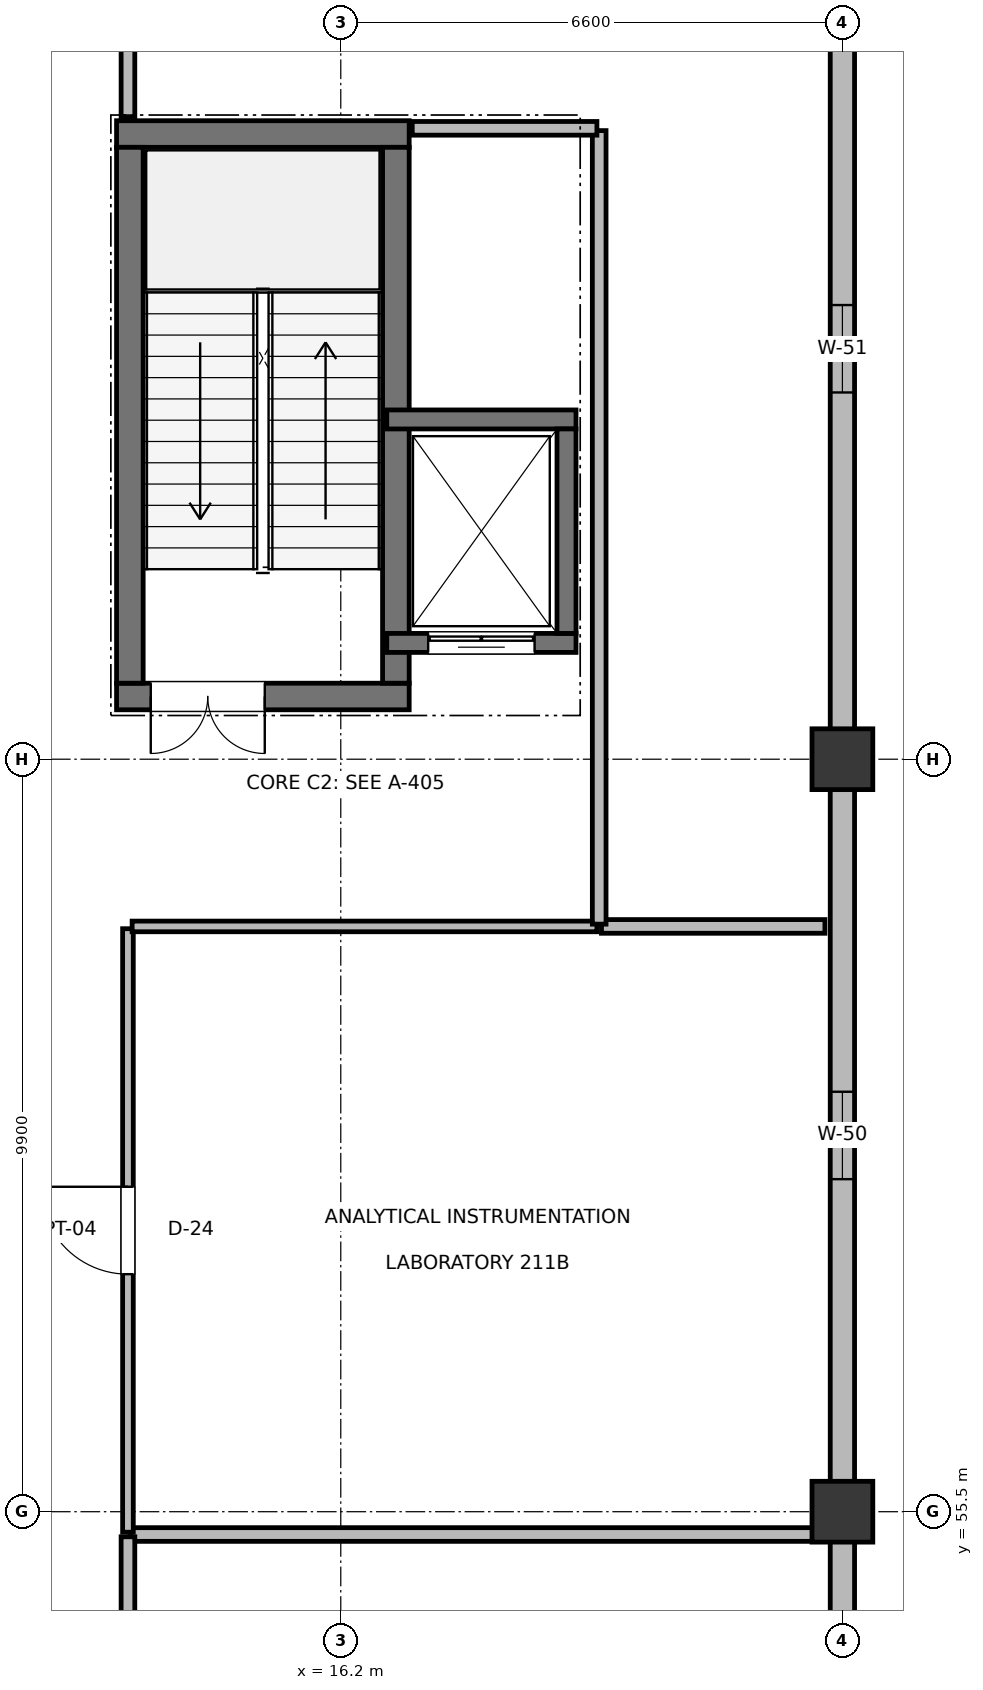
"""IFC4 building model, lengths in metres.
Left out: names, types, materials, properties, quantities, classifications, styles, units other than length and angle.
Written with IfcOpenShell. Run it as: python <this file> out.ifc"""

import sys

from ifc_helpers import new_model, si_unit, direction, frame, frame_2d, origin, origin_2d, place, context, subcontext, project, spatial, rectangle, extrude, element, fill, save


model = new_model("IFC4")
c1 = context("Model", 3, precision=1e-05, world=origin(), true_north=direction((0.0, 1.0)))
c2 = subcontext(c1, "Body", "Model", "MODEL_VIEW")
j1 = project(units=[si_unit("LENGTHUNIT", "METRE"), si_unit("PLANEANGLEUNIT", "RADIAN")], contexts=[c1])
p1 = place(None, origin())
s1 = spatial("IfcSite", under=j1, at=p1, CompositionType="ELEMENT")
p2 = place(p1, origin())
s2 = spatial("IfcBuilding", under=s1, at=p2, CompositionType="ELEMENT")
p3 = place(p2, frame((0.0, 0.0, 10.2)))
s3 = spatial("IfcBuildingStorey", under=s2, at=p3, CompositionType="ELEMENT", Elevation=10.2)
for number, where, z_axis, x_axis in (
    (1, (22.8, 55.5, 0.0), (0.0, 0.0, 1.0), (1.0, 0.0, 0.0)),
    (2, (22.8, 65.4, 0.0), (0.0, 0.0, 1.0), (1.0, 0.0, 0.0)),
):
    element("IfcColumn", number, at=place(p3, frame(where, z_axis=z_axis, x_axis=x_axis)), inside=s3, PredefinedType="COLUMN", context=c2, shape_type="SweptSolid", body=[
        extrude(rectangle(XDim=0.8, YDim=0.8, at=origin_2d()), origin(), (0.0, 0.0, 1.0), 4.8),
    ])
p4 = place(p3, frame((22.8, 45.985, 0.0), z_axis=(0.0, 0.0, 1.0), x_axis=(0.0, 1.0, 0.0)))
e3 = element("IfcWall", 3, at=p4, inside=s3, PredefinedType="SOLIDWALL", context=c2, shape_type="SweptSolid", body=[
    extrude(rectangle(XDim=9.13, YDim=0.32, at=frame_2d((4.565, 0.0))), origin(), (0.0, 0.0, 1.0), 3.625),
])
p5 = place(p4, frame((3.99, 0.0, 0.9)))
e4 = element("IfcOpeningElement", 4, at=p5, cuts=e3, PredefinedType="OPENING", context=c2, shape_type="SweptSolid", body=[
    extrude(rectangle(XDim=1.15, YDim=1.15, at=frame_2d((0.575, 0.575))), frame((0.0, 0.17, 0.0), z_axis=(0.0, -1.0, 0.0), x_axis=(1.0, 0.0, 0.0)), (0.0, 0.0, 1.0), 0.34),
])
p6 = place(p3, frame((22.8, 55.885, 0.0), z_axis=(0.0, 0.0, 1.0), x_axis=(0.0, 1.0, 0.0)))
e5 = element("IfcWall", 5, at=p6, inside=s3, PredefinedType="SOLIDWALL", context=c2, shape_type="SweptSolid", body=[
    extrude(rectangle(XDim=9.13, YDim=0.32, at=frame_2d((4.565, 0.0))), origin(), (0.0, 0.0, 1.0), 3.625),
])
p7 = place(p6, frame((3.99, 0.0, 0.9)))
e6 = element("IfcOpeningElement", 6, at=p7, cuts=e5, PredefinedType="OPENING", context=c2, shape_type="SweptSolid", body=[
    extrude(rectangle(XDim=1.15, YDim=1.35, at=frame_2d((0.575, 0.675))), frame((0.0, 0.17, 0.0), z_axis=(0.0, -1.0, 0.0), x_axis=(1.0, 0.0, 0.0)), (0.0, 0.0, 1.0), 0.34),
])
p8 = place(p3, frame((22.8, 65.785, 0.0), z_axis=(0.0, 0.0, 1.0), x_axis=(0.0, 1.0, 0.0)))
e7 = element("IfcWall", 7, at=p8, inside=s3, PredefinedType="SOLIDWALL", context=c2, shape_type="SweptSolid", body=[
    extrude(rectangle(XDim=10.03, YDim=0.32, at=frame_2d((5.015, 0.0))), origin(), (0.0, 0.0, 1.0), 3.625),
])
p9 = place(p8, frame((4.44, 0.0, 0.9)))
e8 = element("IfcOpeningElement", 8, at=p9, cuts=e7, PredefinedType="OPENING", context=c2, shape_type="SweptSolid", body=[
    extrude(rectangle(XDim=1.15, YDim=1.55, at=frame_2d((0.575, 0.775))), frame((0.0, 0.17, 0.0), z_axis=(0.0, -1.0, 0.0), x_axis=(1.0, 0.0, 0.0)), (0.0, 0.0, 1.0), 0.34),
])
p10 = place(p3, frame((13.25, 66.225, 0.0), z_axis=(0.0, 0.0, 1.0), x_axis=(1.0, 0.0, 0.0)))
e9 = element("IfcWall", 9, at=p10, inside=s3, PredefinedType="SHEAR", context=c2, shape_type="SweptSolid", body=[
    extrude(rectangle(XDim=3.85, YDim=0.35, at=frame_2d((1.925, 0.0))), origin(), (0.0, 0.0, 1.0), 4.58),
])
p11 = place(p10, frame((0.45, 0.0, 0.0)))
e10 = element("IfcOpeningElement", 10, at=p11, cuts=e9, PredefinedType="OPENING", context=c2, shape_type="SweptSolid", body=[
    extrude(rectangle(XDim=1.5, YDim=2.2, at=frame_2d((0.75, 1.1))), frame((0.0, 0.185, 0.0), z_axis=(0.0, -1.0, 0.0), x_axis=(1.0, 0.0, 0.0)), (0.0, 0.0, 1.0), 0.37),
])
p12 = place(p3, frame((13.25, 73.625, 0.0), z_axis=(0.0, 0.0, 1.0), x_axis=(1.0, 0.0, 0.0)))
e11 = element("IfcWall", 11, at=p12, inside=s3, PredefinedType="SHEAR", context=c2, shape_type="SweptSolid", body=[
    extrude(rectangle(XDim=3.85, YDim=0.35, at=frame_2d((1.925, 0.0))), origin(), (0.0, 0.0, 1.0), 4.58),
])
for number, where, z_axis, x_axis in (
    (12, (13.425, 66.4, 0.0), (0.0, 0.0, 1.0), (0.0, 1.0, 0.0)),
    (13, (16.925, 66.4, 0.0), (0.0, 0.0, 1.0), (0.0, 1.0, 0.0)),
):
    element("IfcWall", number, at=place(p3, frame(where, z_axis=z_axis, x_axis=x_axis)), inside=s3, PredefinedType="SHEAR", context=c2, shape_type="SweptSolid", body=[
        extrude(rectangle(XDim=7.05, YDim=0.35, at=frame_2d((3.525, 0.0))), origin(), (0.0, 0.0, 1.0), 4.58),
    ])
p13 = place(p3, frame((16.805, 66.93, 0.0), z_axis=(0.0, 0.0, 1.0), x_axis=(1.0, 0.0, 0.0)))
e14 = element("IfcWall", 14, at=p13, inside=s3, PredefinedType="SHEAR", context=c2, shape_type="SweptSolid", body=[
    extrude(rectangle(XDim=2.49, YDim=0.25, at=frame_2d((1.245, 0.0))), origin(), (0.0, 0.0, 1.0), 4.56),
])
p14 = place(p13, frame((0.545, 0.0, 0.0)))
e15 = element("IfcOpeningElement", 15, at=p14, cuts=e14, PredefinedType="OPENING", context=c2, shape_type="SweptSolid", body=[
    extrude(rectangle(XDim=1.4, YDim=2.3, at=frame_2d((0.7, 1.15))), frame((0.0, 0.135, 0.0), z_axis=(0.0, -1.0, 0.0), x_axis=(1.0, 0.0, 0.0)), (0.0, 0.0, 1.0), 0.27),
])
p15 = place(p3, frame((16.805, 69.87, 0.0), z_axis=(0.0, 0.0, 1.0), x_axis=(1.0, 0.0, 0.0)))
e16 = element("IfcWall", 16, at=p15, inside=s3, PredefinedType="SHEAR", context=c2, shape_type="SweptSolid", body=[
    extrude(rectangle(XDim=2.49, YDim=0.25, at=frame_2d((1.245, 0.0))), origin(), (0.0, 0.0, 1.0), 4.56),
])
p16 = place(p3, frame((19.17, 67.055, 0.0), z_axis=(0.0, 0.0, 1.0), x_axis=(0.0, 1.0, 0.0)))
e17 = element("IfcWall", 17, at=p16, inside=s3, PredefinedType="SHEAR", context=c2, shape_type="SweptSolid", body=[
    extrude(rectangle(XDim=2.69, YDim=0.25, at=frame_2d((1.345, 0.0))), origin(), (0.0, 0.0, 1.0), 4.56),
])
p17 = place(p3, frame((13.43, 55.2, 0.0), z_axis=(0.0, 0.0, 1.0), x_axis=(1.0, 0.0, 0.0)))
e18 = element("IfcWall", 18, at=p17, inside=s3, PredefinedType="PARTITIONING", context=c2, shape_type="SweptSolid", body=[
    extrude(rectangle(XDim=9.14, YDim=0.18, at=frame_2d((4.57, 0.0))), origin(), (0.0, 0.0, 1.0), 3.875),
])
p18 = place(p3, frame((13.4, 30.03, 0.0), z_axis=(0.0, 0.0, 1.0), x_axis=(0.0, 1.0, 0.0)))
e19 = element("IfcWall", 19, at=p18, inside=s3, PredefinedType="PARTITIONING", context=c2, shape_type="SweptSolid", body=[
    extrude(rectangle(XDim=25.14, YDim=0.18, at=frame_2d((12.57, 0.0))), origin(), (0.0, 0.0, 1.0), 3.455),
])
p19 = place(p18, frame((11.87, 0.0, 0.0)))
e20 = element("IfcOpeningElement", 20, at=p19, cuts=e19, PredefinedType="OPENING", context=c2, shape_type="SweptSolid", body=[
    extrude(rectangle(XDim=1.4, YDim=2.2, at=frame_2d((0.7, 1.1))), frame((0.0, 0.1, 0.0), z_axis=(0.0, -1.0, 0.0), x_axis=(1.0, 0.0, 0.0)), (0.0, 0.0, 1.0), 0.2),
])
p20 = place(p3, frame((19.63, 63.2, 0.0), z_axis=(0.0, 0.0, 1.0), x_axis=(1.0, 0.0, 0.0)))
e21 = element("IfcWall", 21, at=p20, inside=s3, PredefinedType="PARTITIONING", context=c2, shape_type="SweptSolid", body=[
    extrude(rectangle(XDim=2.94, YDim=0.18, at=frame_2d((1.47, 0.0))), origin(), (0.0, 0.0, 1.0), 3.625),
])
p21 = place(p3, frame((13.4, 55.23, 0.0), z_axis=(0.0, 0.0, 1.0), x_axis=(0.0, 1.0, 0.0)))
e22 = element("IfcWall", 22, at=p21, inside=s3, PredefinedType="PARTITIONING", context=c2, shape_type="SweptSolid", body=[
    extrude(rectangle(XDim=7.94, YDim=0.14, at=frame_2d((3.97, 0.0))), origin(), (0.0, 0.0, 1.0), 3.675),
])
p22 = place(p21, frame((3.395, 0.0, 0.0)))
e23 = element("IfcOpeningElement", 23, at=p22, cuts=e22, PredefinedType="OPENING", context=c2, shape_type="SweptSolid", body=[
    extrude(rectangle(XDim=1.15, YDim=2.15, at=frame_2d((0.575, 1.075))), frame((0.0, 0.08, 0.0), z_axis=(0.0, -1.0, 0.0), x_axis=(1.0, 0.0, 0.0)), (0.0, 0.0, 1.0), 0.16),
])
p23 = place(p3, frame((13.455, 63.2, 0.0), z_axis=(0.0, 0.0, 1.0), x_axis=(1.0, 0.0, 0.0)))
e24 = element("IfcWall", 24, at=p23, inside=s3, PredefinedType="PARTITIONING", context=c2, shape_type="SweptSolid", body=[
    extrude(rectangle(XDim=6.115, YDim=0.14, at=frame_2d((3.058, 0.0))), origin(), (0.0, 0.0, 1.0), 3.875),
])
p24 = place(p3, frame((13.4, 73.853, 0.0), z_axis=(0.0, 0.0, 1.0), x_axis=(0.0, 1.0, 0.0)))
e25 = element("IfcWall", 25, at=p24, inside=s3, PredefinedType="PARTITIONING", context=c2, shape_type="SweptSolid", body=[
    extrude(rectangle(XDim=11.117, YDim=0.18, at=frame_2d((5.558, 0.0))), origin(), (0.0, 0.0, 1.0), 3.515),
])
p25 = place(p24, frame((5.033, 0.0, 0.0)))
e26 = element("IfcOpeningElement", 26, at=p25, cuts=e25, PredefinedType="OPENING", context=c2, shape_type="SweptSolid", body=[
    extrude(rectangle(XDim=1.05, YDim=2.2, at=frame_2d((0.525, 1.1))), frame((0.0, 0.1, 0.0), z_axis=(0.0, -1.0, 0.0), x_axis=(1.0, 0.0, 0.0)), (0.0, 0.0, 1.0), 0.2),
])
p26 = place(p3, frame((19.6, 63.23, 0.0), z_axis=(0.0, 0.0, 1.0), x_axis=(0.0, 1.0, 0.0)))
e27 = element("IfcWall", 27, at=p26, inside=s3, PredefinedType="PARTITIONING", context=c2, shape_type="SweptSolid", body=[
    extrude(rectangle(XDim=10.44, YDim=0.18, at=frame_2d((5.22, 0.0))), origin(), (0.0, 0.0, 1.0), 3.595),
])
p27 = place(p3, frame((17.14, 73.7, 0.0), z_axis=(0.0, 0.0, 1.0), x_axis=(1.0, 0.0, 0.0)))
e28 = element("IfcWall", 28, at=p27, inside=s3, PredefinedType="PARTITIONING", context=c2, shape_type="SweptSolid", body=[
    extrude(rectangle(XDim=2.43, YDim=0.18, at=frame_2d((1.215, 0.0))), origin(), (0.0, 0.0, 1.0), 4.48),
])
p28 = place(p7, frame((1.15, 0.0, 0.0), z_axis=(0.0, 0.0, 1.0), x_axis=(-1.0, 0.0, 0.0)))
e29 = element("IfcWindow", 29, at=p28, inside=s3, PartitioningType="DOUBLE_PANEL_VERTICAL", PredefinedType="WINDOW", context=c2, shape_type="SweptSolid", body=[
    extrude(rectangle(XDim=1.15, YDim=1.35, at=frame_2d((0.575, 0.675))), frame((0.0, 0.03, 0.0), z_axis=(0.0, -1.0, 0.0), x_axis=(1.0, 0.0, 0.0)), (0.0, 0.0, 1.0), 0.06),
])
fill(e6, e29)
p29 = place(p9, frame((1.15, 0.0, 0.0), z_axis=(0.0, 0.0, 1.0), x_axis=(-1.0, 0.0, 0.0)))
e30 = element("IfcWindow", 30, at=p29, inside=s3, PartitioningType="DOUBLE_PANEL_VERTICAL", PredefinedType="WINDOW", context=c2, shape_type="SweptSolid", body=[
    extrude(rectangle(XDim=1.15, YDim=1.55, at=frame_2d((0.575, 0.775))), frame((0.0, 0.03, 0.0), z_axis=(0.0, -1.0, 0.0), x_axis=(1.0, 0.0, 0.0)), (0.0, 0.0, 1.0), 0.06),
])
fill(e8, e30)
p30 = place(p11, frame((1.5, 0.0, 0.0), z_axis=(0.0, 0.0, 1.0), x_axis=(-1.0, 0.0, 0.0)))
e31 = element("IfcDoor", 31, at=p30, inside=s3, OperationType="DOUBLE_DOOR_SINGLE_SWING", PredefinedType="DOOR", context=c2, shape_type="SweptSolid", body=[
    extrude(rectangle(XDim=1.5, YDim=2.2, at=frame_2d((0.75, 1.1))), frame((0.0, 0.025, 0.0), z_axis=(0.0, -1.0, 0.0), x_axis=(1.0, 0.0, 0.0)), (0.0, 0.0, 1.0), 0.05),
])
fill(e10, e31)
p31 = place(p14, frame((1.4, 0.0, 0.0), z_axis=(0.0, 0.0, 1.0), x_axis=(-1.0, 0.0, 0.0)))
e32 = element("IfcDoor", 32, at=p31, inside=s3, OperationType="DOUBLE_DOOR_SLIDING", PredefinedType="DOOR", context=c2, shape_type="SweptSolid", body=[
    extrude(rectangle(XDim=1.4, YDim=2.3, at=frame_2d((0.7, 1.15))), frame((0.0, 0.025, 0.0), z_axis=(0.0, -1.0, 0.0), x_axis=(1.0, 0.0, 0.0)), (0.0, 0.0, 1.0), 0.05),
])
fill(e15, e32)
p32 = place(p22, origin())
e33 = element("IfcDoor", 33, at=p32, inside=s3, OperationType="SINGLE_SWING_RIGHT", PredefinedType="DOOR", context=c2, shape_type="SweptSolid", body=[
    extrude(rectangle(XDim=1.15, YDim=2.15, at=frame_2d((0.575, 1.075))), frame((0.0, 0.025, 0.0), z_axis=(0.0, -1.0, 0.0), x_axis=(1.0, 0.0, 0.0)), (0.0, 0.0, 1.0), 0.05),
])
fill(e23, e33)
save(model, sys.argv[1])
